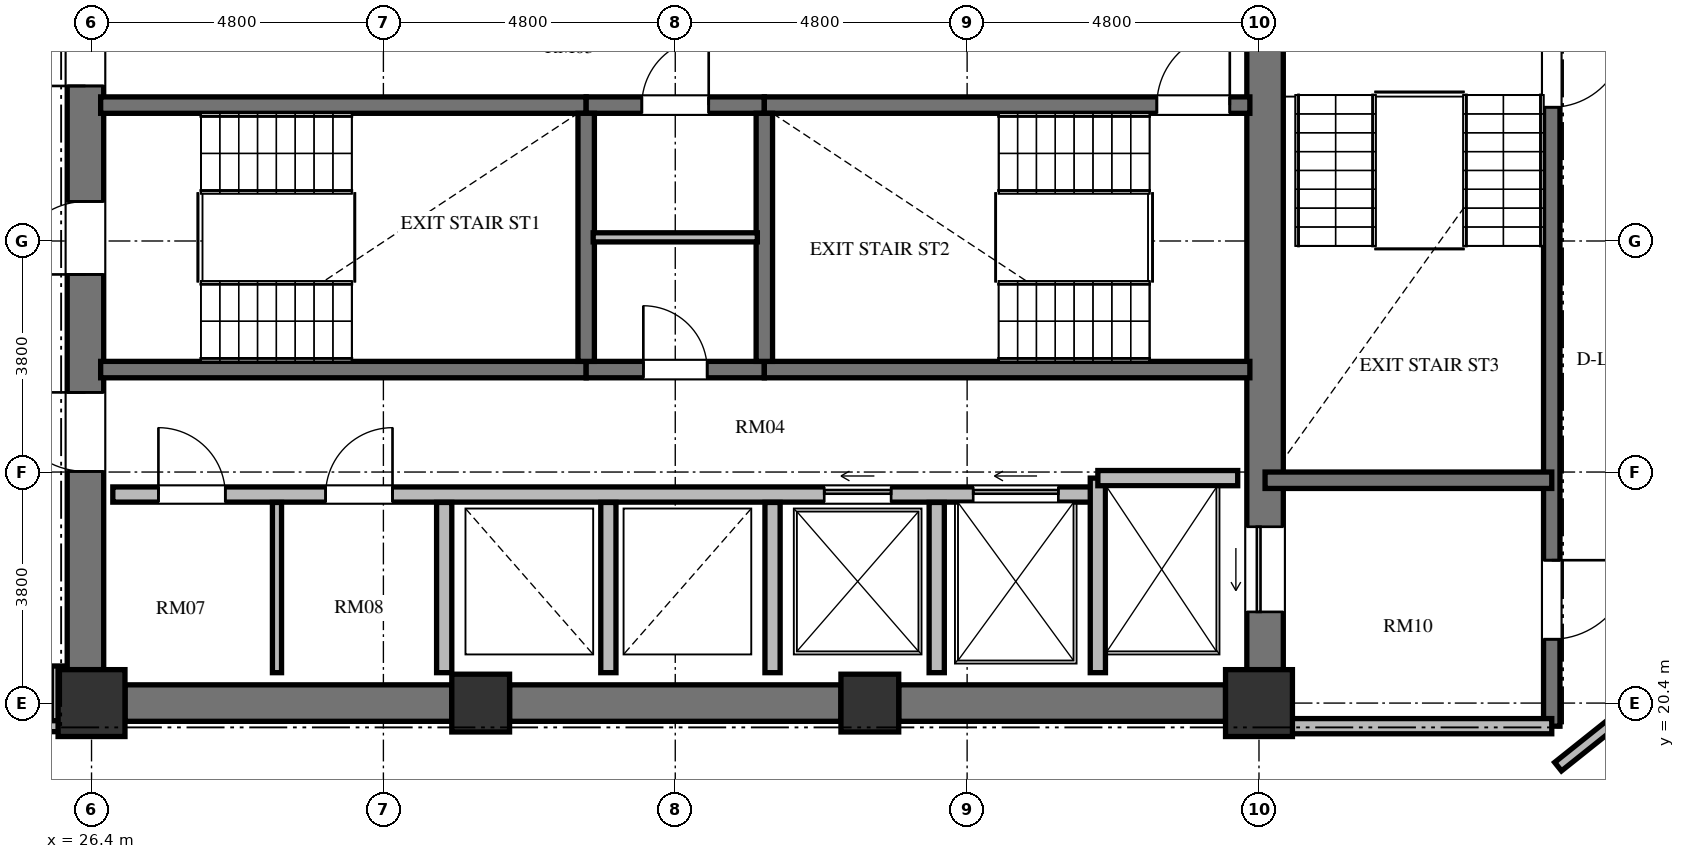
"""IFC4 building model, lengths in metres.
Left out: names, types, materials, properties, quantities, classifications, styles, units other than length and angle.
Written with IfcOpenShell. Run it as: python <this file> out.ifc"""

import sys

from ifc_helpers import new_model, si_unit, direction, frame, frame_2d, origin, origin_2d, place, context, subcontext, project, spatial, rectangle, extrude, element, fill, save


model = new_model("IFC4")
c1 = context("Model", 3, precision=1e-05, world=origin(), true_north=direction((0.0, 1.0)))
c2 = subcontext(c1, "Body", "Model", "MODEL_VIEW")
j1 = project(units=[si_unit("LENGTHUNIT", "METRE"), si_unit("PLANEANGLEUNIT", "RADIAN")], contexts=[c1])
p1 = place(None, origin())
s1 = spatial("IfcSite", under=j1, at=p1, CompositionType="ELEMENT")
p2 = place(p1, origin())
s2 = spatial("IfcBuilding", under=s1, at=p2, CompositionType="ELEMENT")
p3 = place(p2, frame((0.0, 0.0, 189.36)))
s3 = spatial("IfcBuildingStorey", under=s2, at=p3, CompositionType="ELEMENT", Elevation=189.36)
p4 = place(p3, frame((26.4, 20.4, 0.0), z_axis=(0.0, 0.0, 1.0), x_axis=(1.0, 0.0, 0.0)))
e1 = element("IfcColumn", 1, at=p4, inside=s3, PredefinedType="COLUMN", context=c2, shape_type="SweptSolid", body=[
    extrude(rectangle(XDim=1.1, YDim=1.1, at=origin_2d()), origin(), (0.0, 0.0, 1.0), 5.472),
])
for number, where, z_axis, x_axis in (
    (2, (32.8, 20.4, 0.0), (0.0, 0.0, 1.0), (1.0, 0.0, 0.0)),
    (3, (39.2, 20.4, 0.0), (0.0, 0.0, 1.0), (1.0, 0.0, 0.0)),
):
    element("IfcColumn", number, at=place(p3, frame(where, z_axis=z_axis, x_axis=x_axis)), inside=s3, PredefinedType="COLUMN", context=c2, shape_type="SweptSolid", body=[
        extrude(rectangle(XDim=0.95, YDim=0.95, at=origin_2d()), origin(), (0.0, 0.0, 1.0), 5.472),
    ])
p5 = place(p3, frame((45.6, 20.4, 0.0), z_axis=(0.0, 0.0, 1.0), x_axis=(1.0, 0.0, 0.0)))
e4 = element("IfcColumn", 4, at=p5, inside=s3, PredefinedType="COLUMN", context=c2, shape_type="SweptSolid", body=[
    extrude(rectangle(XDim=1.1, YDim=1.1, at=origin_2d()), origin(), (0.0, 0.0, 1.0), 5.472),
])
p6 = place(p3, frame((26.3, 20.95, 0.0), z_axis=(0.0, 0.0, 1.0), x_axis=(0.0, 1.0, 0.0)))
e5 = element("IfcWall", 5, at=p6, inside=s3, PredefinedType="SHEAR", context=c2, shape_type="SweptSolid", body=[
    extrude(rectangle(XDim=14.1, YDim=0.6, at=frame_2d((7.05, 0.0))), origin(), (0.0, 0.0, 1.0), 5.472),
])
p7 = place(p6, frame((6.5, 0.0, 0.0)))
e6 = element("IfcOpeningElement", 6, at=p7, cuts=e5, PredefinedType="OPENING", context=c2, shape_type="SweptSolid", body=[
    extrude(rectangle(XDim=1.2, YDim=2.15, at=frame_2d((0.6, 1.075))), frame((0.0, 0.31, 0.0), z_axis=(0.0, -1.0, 0.0), x_axis=(1.0, 0.0, 0.0)), (0.0, 0.0, 1.0), 0.62),
])
p8 = place(p6, frame((9.6, 0.0, 0.0)))
e7 = element("IfcOpeningElement", 7, at=p8, cuts=e5, PredefinedType="OPENING", context=c2, shape_type="SweptSolid", body=[
    extrude(rectangle(XDim=1.3, YDim=2.2, at=frame_2d((0.65, 1.1))), frame((0.0, 0.31, 0.0), z_axis=(0.0, -1.0, 0.0), x_axis=(1.0, 0.0, 0.0)), (0.0, 0.0, 1.0), 0.62),
])
p9 = place(p6, frame((3.26, 0.0, 0.0)))
e8 = element("IfcOpeningElement", 8, at=p9, cuts=e5, PredefinedType="OPENING", context=c2, shape_type="SweptSolid", body=[
    extrude(rectangle(XDim=1.3, YDim=2.2, at=frame_2d((0.65, 1.1))), frame((0.0, 0.31, 0.0), z_axis=(0.0, -1.0, 0.0), x_axis=(1.0, 0.0, 0.0)), (0.0, 0.0, 1.0), 0.62),
])
p10 = place(p3, frame((45.7, 20.95, 0.0), z_axis=(0.0, 0.0, 1.0), x_axis=(0.0, 1.0, 0.0)))
e9 = element("IfcWall", 9, at=p10, inside=s3, PredefinedType="SHEAR", context=c2, shape_type="SweptSolid", body=[
    extrude(rectangle(XDim=14.1, YDim=0.6, at=frame_2d((7.05, 0.0))), origin(), (0.0, 0.0, 1.0), 5.472),
])
p11 = place(p10, frame((11.75, 0.0, 0.0)))
e10 = element("IfcOpeningElement", 10, at=p11, cuts=e9, PredefinedType="OPENING", context=c2, shape_type="SweptSolid", body=[
    extrude(rectangle(XDim=1.4, YDim=2.3, at=frame_2d((0.7, 1.15))), frame((0.0, 0.31, 0.0), z_axis=(0.0, -1.0, 0.0), x_axis=(1.0, 0.0, 0.0)), (0.0, 0.0, 1.0), 0.62),
])
p12 = place(p10, frame((0.95, 0.0, 0.0)))
e11 = element("IfcOpeningElement", 11, at=p12, cuts=e9, PredefinedType="OPENING", context=c2, shape_type="SweptSolid", body=[
    extrude(rectangle(XDim=1.4, YDim=2.3, at=frame_2d((0.7, 1.15))), frame((0.0, 0.31, 0.0), z_axis=(0.0, -1.0, 0.0), x_axis=(1.0, 0.0, 0.0)), (0.0, 0.0, 1.0), 0.62),
])
p13 = place(p3, frame((26.95, 20.4, 0.0), z_axis=(0.0, 0.0, 1.0), x_axis=(1.0, 0.0, 0.0)))
e12 = element("IfcWall", 12, at=p13, inside=s3, PredefinedType="SHEAR", context=c2, shape_type="SweptSolid", body=[
    extrude(rectangle(XDim=5.375, YDim=0.6, at=frame_2d((2.688, 0.0))), origin(), (0.0, 0.0, 1.0), 5.472),
])
p14 = place(p3, frame((33.275, 20.4, 0.0), z_axis=(0.0, 0.0, 1.0), x_axis=(1.0, 0.0, 0.0)))
e13 = element("IfcWall", 13, at=p14, inside=s3, PredefinedType="SHEAR", context=c2, shape_type="SweptSolid", body=[
    extrude(rectangle(XDim=5.45, YDim=0.6, at=frame_2d((2.725, 0.0))), origin(), (0.0, 0.0, 1.0), 5.472),
])
p15 = place(p3, frame((39.675, 20.4, 0.0), z_axis=(0.0, 0.0, 1.0), x_axis=(1.0, 0.0, 0.0)))
e14 = element("IfcWall", 14, at=p15, inside=s3, PredefinedType="SHEAR", context=c2, shape_type="SweptSolid", body=[
    extrude(rectangle(XDim=5.375, YDim=0.6, at=frame_2d((2.688, 0.0))), origin(), (0.0, 0.0, 1.0), 5.472),
])
p16 = place(p3, frame((26.55, 30.235, 0.0), z_axis=(0.0, 0.0, 1.0), x_axis=(1.0, 0.0, 0.0)))
e15 = element("IfcWall", 15, at=p16, inside=s3, PredefinedType="SHEAR", context=c2, shape_type="SweptSolid", body=[
    extrude(rectangle(XDim=7.985, YDim=0.27, at=frame_2d((3.992, 0.0))), origin(), (0.0, 0.0, 1.0), 5.472),
])
p17 = place(p3, frame((34.535, 30.235, 0.0), z_axis=(0.0, 0.0, 1.0), x_axis=(1.0, 0.0, 0.0)))
e16 = element("IfcWall", 16, at=p17, inside=s3, PredefinedType="SHEAR", context=c2, shape_type="SweptSolid", body=[
    extrude(rectangle(XDim=2.93, YDim=0.27, at=frame_2d((1.465, 0.0))), origin(), (0.0, 0.0, 1.0), 5.472),
])
p18 = place(p17, frame((0.915, 0.0, 0.0)))
e17 = element("IfcOpeningElement", 17, at=p18, cuts=e16, PredefinedType="OPENING", context=c2, shape_type="SweptSolid", body=[
    extrude(rectangle(XDim=1.1, YDim=2.15, at=frame_2d((0.55, 1.075))), frame((0.0, 0.145, 0.0), z_axis=(0.0, -1.0, 0.0), x_axis=(1.0, 0.0, 0.0)), (0.0, 0.0, 1.0), 0.29),
])
p19 = place(p3, frame((37.465, 30.235, 0.0), z_axis=(0.0, 0.0, 1.0), x_axis=(1.0, 0.0, 0.0)))
e18 = element("IfcWall", 18, at=p19, inside=s3, PredefinedType="SHEAR", context=c2, shape_type="SweptSolid", body=[
    extrude(rectangle(XDim=7.985, YDim=0.27, at=frame_2d((3.992, 0.0))), origin(), (0.0, 0.0, 1.0), 5.472),
])
p20 = place(p19, frame((6.455, 0.0, 0.0)))
e19 = element("IfcOpeningElement", 19, at=p20, cuts=e18, PredefinedType="OPENING", context=c2, shape_type="SweptSolid", body=[
    extrude(rectangle(XDim=1.2, YDim=2.15, at=frame_2d((0.6, 1.075))), frame((0.0, 0.145, 0.0), z_axis=(0.0, -1.0, 0.0), x_axis=(1.0, 0.0, 0.0)), (0.0, 0.0, 1.0), 0.29),
])
p21 = place(p3, frame((26.55, 25.885, 0.0), z_axis=(0.0, 0.0, 1.0), x_axis=(1.0, 0.0, 0.0)))
e20 = element("IfcWall", 20, at=p21, inside=s3, PredefinedType="SHEAR", context=c2, shape_type="SweptSolid", body=[
    extrude(rectangle(XDim=7.985, YDim=0.27, at=frame_2d((3.992, 0.0))), origin(), (0.0, 0.0, 1.0), 5.472),
])
p22 = place(p3, frame((34.535, 25.885, 0.0), z_axis=(0.0, 0.0, 1.0), x_axis=(1.0, 0.0, 0.0)))
e21 = element("IfcWall", 21, at=p22, inside=s3, PredefinedType="SHEAR", context=c2, shape_type="SweptSolid", body=[
    extrude(rectangle(XDim=2.93, YDim=0.27, at=frame_2d((1.465, 0.0))), origin(), (0.0, 0.0, 1.0), 5.472),
])
p23 = place(p22, frame((0.94, 0.0, 0.0)))
e22 = element("IfcOpeningElement", 22, at=p23, cuts=e21, PredefinedType="OPENING", context=c2, shape_type="SweptSolid", body=[
    extrude(rectangle(XDim=1.05, YDim=2.15, at=frame_2d((0.525, 1.075))), frame((0.0, 0.145, 0.0), z_axis=(0.0, -1.0, 0.0), x_axis=(1.0, 0.0, 0.0)), (0.0, 0.0, 1.0), 0.29),
])
p24 = place(p3, frame((37.465, 25.885, 0.0), z_axis=(0.0, 0.0, 1.0), x_axis=(1.0, 0.0, 0.0)))
e23 = element("IfcWall", 23, at=p24, inside=s3, PredefinedType="SHEAR", context=c2, shape_type="SweptSolid", body=[
    extrude(rectangle(XDim=7.985, YDim=0.27, at=frame_2d((3.992, 0.0))), origin(), (0.0, 0.0, 1.0), 5.472),
])
for number, where, z_axis, x_axis in (
    (24, (34.535, 26.02, 0.0), (0.0, 0.0, 1.0), (0.0, 1.0, 0.0)),
    (25, (37.465, 26.02, 0.0), (0.0, 0.0, 1.0), (0.0, 1.0, 0.0)),
):
    element("IfcWall", number, at=place(p3, frame(where, z_axis=z_axis, x_axis=x_axis)), inside=s3, PredefinedType="SHEAR", context=c2, shape_type="SweptSolid", body=[
        extrude(rectangle(XDim=4.08, YDim=0.27, at=frame_2d((2.04, 0.0))), origin(), (0.0, 0.0, 1.0), 5.472),
    ])
p25 = place(p3, frame((34.65, 28.06, 0.0), z_axis=(0.0, 0.0, 1.0), x_axis=(1.0, 0.0, 0.0)))
e26 = element("IfcWall", 26, at=p25, inside=s3, PredefinedType="PARTITIONING", context=c2, shape_type="SweptSolid", body=[
    extrude(rectangle(XDim=2.7, YDim=0.15, at=frame_2d((1.35, 0.0))), origin(), (0.0, 0.0, 1.0), 5.022),
])
p26 = place(p3, frame((26.75, 23.83, 0.0), z_axis=(0.0, 0.0, 1.0), x_axis=(1.0, 0.0, 0.0)))
e27 = element("IfcWall", 27, at=p26, inside=s3, PredefinedType="SOLIDWALL", context=c2, shape_type="SweptSolid", body=[
    extrude(rectangle(XDim=16.2, YDim=0.25, at=frame_2d((8.1, 0.0))), origin(), (0.0, 0.0, 1.0), 5.022),
])
p27 = place(p26, frame((0.75, 0.0, 0.0)))
e28 = element("IfcOpeningElement", 28, at=p27, cuts=e27, PredefinedType="OPENING", context=c2, shape_type="SweptSolid", body=[
    extrude(rectangle(XDim=1.1, YDim=2.15, at=frame_2d((0.55, 1.075))), frame((0.0, 0.135, 0.0), z_axis=(0.0, -1.0, 0.0), x_axis=(1.0, 0.0, 0.0)), (0.0, 0.0, 1.0), 0.27),
])
p28 = place(p26, frame((3.5, 0.0, 0.0)))
e29 = element("IfcOpeningElement", 29, at=p28, cuts=e27, PredefinedType="OPENING", context=c2, shape_type="SweptSolid", body=[
    extrude(rectangle(XDim=1.1, YDim=2.15, at=frame_2d((0.55, 1.075))), frame((0.0, 0.135, 0.0), z_axis=(0.0, -1.0, 0.0), x_axis=(1.0, 0.0, 0.0)), (0.0, 0.0, 1.0), 0.27),
])
p29 = place(p26, frame((11.7, 0.0, 0.0)))
e30 = element("IfcOpeningElement", 30, at=p29, cuts=e27, PredefinedType="OPENING", context=c2, shape_type="SweptSolid", body=[
    extrude(rectangle(XDim=1.1, YDim=2.2, at=frame_2d((0.55, 1.1))), frame((0.0, 0.135, 0.0), z_axis=(0.0, -1.0, 0.0), x_axis=(1.0, 0.0, 0.0)), (0.0, 0.0, 1.0), 0.27),
])
p30 = place(p26, frame((14.15, 0.0, 0.0)))
e31 = element("IfcOpeningElement", 31, at=p30, cuts=e27, PredefinedType="OPENING", context=c2, shape_type="SweptSolid", body=[
    extrude(rectangle(XDim=1.4, YDim=2.3, at=frame_2d((0.7, 1.15))), frame((0.0, 0.135, 0.0), z_axis=(0.0, -1.0, 0.0), x_axis=(1.0, 0.0, 0.0)), (0.0, 0.0, 1.0), 0.27),
])
p31 = place(p3, frame((42.95, 20.9, 0.0), z_axis=(0.0, 0.0, 1.0), x_axis=(0.0, 1.0, 0.0)))
e32 = element("IfcWall", 32, at=p31, inside=s3, PredefinedType="SOLIDWALL", context=c2, shape_type="SweptSolid", body=[
    extrude(rectangle(XDim=3.2, YDim=0.25, at=frame_2d((1.6, 0.0))), origin(), (0.0, 0.0, 1.0), 5.022),
])
p32 = place(p3, frame((42.95, 24.1, 0.0), z_axis=(0.0, 0.0, 1.0), x_axis=(1.0, 0.0, 0.0)))
e33 = element("IfcWall", 33, at=p32, inside=s3, PredefinedType="SOLIDWALL", context=c2, shape_type="SweptSolid", body=[
    extrude(rectangle(XDim=2.3, YDim=0.25, at=frame_2d((1.15, 0.0))), origin(), (0.0, 0.0, 1.0), 5.022),
])
for number, where, z_axis, x_axis in (
    (34, (32.2, 20.9, 0.0), (0.0, 0.0, 1.0), (0.0, 1.0, 0.0)),
    (35, (34.9, 20.9, 0.0), (0.0, 0.0, 1.0), (0.0, 1.0, 0.0)),
    (36, (37.6, 20.9, 0.0), (0.0, 0.0, 1.0), (0.0, 1.0, 0.0)),
    (37, (40.3, 20.9, 0.0), (0.0, 0.0, 1.0), (0.0, 1.0, 0.0)),
):
    element("IfcWall", number, at=place(p3, frame(where, z_axis=z_axis, x_axis=x_axis)), inside=s3, PredefinedType="SOLIDWALL", context=c2, shape_type="SweptSolid", body=[
        extrude(rectangle(XDim=2.8, YDim=0.25, at=frame_2d((1.4, 0.0))), origin(), (0.0, 0.0, 1.0), 5.022),
    ])
p33 = place(p3, frame((29.45, 20.9, 0.0), z_axis=(0.0, 0.0, 1.0), x_axis=(0.0, 1.0, 0.0)))
e38 = element("IfcWall", 38, at=p33, inside=s3, PredefinedType="PARTITIONING", context=c2, shape_type="SweptSolid", body=[
    extrude(rectangle(XDim=2.8, YDim=0.15, at=frame_2d((1.4, 0.0))), origin(), (0.0, 0.0, 1.0), 5.022),
])
p34 = place(p3, frame((50.415, 35.845, 0.0), z_axis=(0.0, 0.0, 1.0), x_axis=(0.0, -1.0, 0.0)))
e39 = element("IfcWall", 39, at=p34, inside=s3, PredefinedType="SHEAR", context=c2, shape_type="SweptSolid", body=[
    extrude(rectangle(XDim=15.825, YDim=0.27, at=frame_2d((7.913, 0.0))), origin(), (0.0, 0.0, 1.0), 5.472),
])
p35 = place(p34, frame((4.445, 0.0, 0.0)))
e40 = element("IfcOpeningElement", 40, at=p35, cuts=e39, PredefinedType="OPENING", context=c2, shape_type="SweptSolid", body=[
    extrude(rectangle(XDim=1.2, YDim=2.15, at=frame_2d((0.6, 1.075))), frame((0.0, 0.145, 0.0), z_axis=(0.0, -1.0, 0.0), x_axis=(1.0, 0.0, 0.0)), (0.0, 0.0, 1.0), 0.29),
])
p36 = place(p34, frame((1.295, 0.0, 0.0)))
e41 = element("IfcOpeningElement", 41, at=p36, cuts=e39, PredefinedType="OPENING", context=c2, shape_type="SweptSolid", body=[
    extrude(rectangle(XDim=1.3, YDim=2.2, at=frame_2d((0.65, 1.1))), frame((0.0, 0.145, 0.0), z_axis=(0.0, -1.0, 0.0), x_axis=(1.0, 0.0, 0.0)), (0.0, 0.0, 1.0), 0.29),
])
p37 = place(p34, frame((13.095, 0.0, 0.0)))
e42 = element("IfcOpeningElement", 42, at=p37, cuts=e39, PredefinedType="OPENING", context=c2, shape_type="SweptSolid", body=[
    extrude(rectangle(XDim=1.3, YDim=2.2, at=frame_2d((0.65, 1.1))), frame((0.0, 0.145, 0.0), z_axis=(0.0, -1.0, 0.0), x_axis=(1.0, 0.0, 0.0)), (0.0, 0.0, 1.0), 0.29),
])
p38 = place(p3, frame((45.7, 24.065, 0.0), z_axis=(0.0, 0.0, 1.0), x_axis=(1.0, 0.0, 0.0)))
e43 = element("IfcWall", 43, at=p38, inside=s3, PredefinedType="SHEAR", context=c2, shape_type="SweptSolid", body=[
    extrude(rectangle(XDim=4.715, YDim=0.27, at=frame_2d((2.357, 0.0))), origin(), (0.0, 0.0, 1.0), 5.472),
])
p39 = place(p3, frame((45.7, 20.02, 0.0), z_axis=(0.0, 0.0, 1.0), x_axis=(1.0, 0.0, 0.0)))
e44 = element("IfcWall", 44, at=p39, inside=s3, PredefinedType="SOLIDWALL", context=c2, shape_type="SweptSolid", body=[
    extrude(rectangle(XDim=4.715, YDim=0.25, at=frame_2d((2.357, 0.0))), origin(), (0.0, 0.0, 1.0), 5.022),
])
p40 = place(p3, frame((52.781, 21.161, 0.0), z_axis=(0.0, 0.0, 1.0), x_axis=(-0.781386795829, -0.624047013697, 0.0)))
e45 = element("IfcWall", 45, at=p40, inside=s3, PredefinedType="PARTITIONING", context=c2, shape_type="SweptSolid", body=[
    extrude(rectangle(XDim=2.896, YDim=0.18, at=frame_2d((1.448, 0.0))), origin(), (0.0, 0.0, 1.0), 5.022),
])
p41 = place(p3, frame((25.83, 21.01, 0.0), z_axis=(0.0, 0.0, 1.0), x_axis=(0.0, -1.0, 0.0)))
e46 = element("IfcWall", 46, at=p41, inside=s3, PredefinedType="PARTITIONING", context=c2, shape_type="SweptSolid", body=[
    extrude(rectangle(XDim=1.03, YDim=0.18, at=frame_2d((0.515, 0.0))), origin(), (0.0, 0.0, 1.0), 5.022),
])
p42 = place(p3, frame((25.87, 20.02, 0.0), z_axis=(0.0, 0.0, 1.0), x_axis=(-1.0, 0.0, 0.0)))
e47 = element("IfcWall", 47, at=p42, inside=s3, PredefinedType="PARTITIONING", context=c2, shape_type="SweptSolid", body=[
    extrude(rectangle(XDim=2.56, YDim=0.18, at=frame_2d((1.28, 0.0))), origin(), (0.0, 0.0, 1.0), 5.022),
])
p43 = place(p7, origin())
e48 = element("IfcDoor", 48, at=p43, inside=s3, OperationType="SINGLE_SWING_LEFT", PredefinedType="DOOR", context=c2, shape_type="SweptSolid", body=[
    extrude(rectangle(XDim=1.2, YDim=2.15, at=frame_2d((0.6, 1.075))), frame((0.0, 0.025, 0.0), z_axis=(0.0, -1.0, 0.0), x_axis=(1.0, 0.0, 0.0)), (0.0, 0.0, 1.0), 0.05),
])
fill(e6, e48)
p44 = place(p20, origin())
e49 = element("IfcDoor", 49, at=p44, inside=s3, OperationType="SINGLE_SWING_RIGHT", PredefinedType="DOOR", context=c2, shape_type="SweptSolid", body=[
    extrude(rectangle(XDim=1.2, YDim=2.15, at=frame_2d((0.6, 1.075))), frame((0.0, 0.025, 0.0), z_axis=(0.0, -1.0, 0.0), x_axis=(1.0, 0.0, 0.0)), (0.0, 0.0, 1.0), 0.05),
])
fill(e19, e49)
p45 = place(p23, origin())
e50 = element("IfcDoor", 50, at=p45, inside=s3, OperationType="SINGLE_SWING_LEFT", PredefinedType="DOOR", context=c2, shape_type="SweptSolid", body=[
    extrude(rectangle(XDim=1.05, YDim=2.15, at=frame_2d((0.525, 1.075))), frame((0.0, 0.025, 0.0), z_axis=(0.0, -1.0, 0.0), x_axis=(1.0, 0.0, 0.0)), (0.0, 0.0, 1.0), 0.05),
])
fill(e22, e50)
p46 = place(p18, origin())
e51 = element("IfcDoor", 51, at=p46, inside=s3, OperationType="SINGLE_SWING_RIGHT", PredefinedType="DOOR", context=c2, shape_type="SweptSolid", body=[
    extrude(rectangle(XDim=1.1, YDim=2.15, at=frame_2d((0.55, 1.075))), frame((0.0, 0.025, 0.0), z_axis=(0.0, -1.0, 0.0), x_axis=(1.0, 0.0, 0.0)), (0.0, 0.0, 1.0), 0.05),
])
fill(e17, e51)
p47 = place(p8, origin())
e52 = element("IfcDoor", 52, at=p47, inside=s3, OperationType="SINGLE_SWING_LEFT", PredefinedType="DOOR", context=c2, shape_type="SweptSolid", body=[
    extrude(rectangle(XDim=1.3, YDim=2.2, at=frame_2d((0.65, 1.1))), frame((0.0, 0.025, 0.0), z_axis=(0.0, -1.0, 0.0), x_axis=(1.0, 0.0, 0.0)), (0.0, 0.0, 1.0), 0.05),
])
fill(e7, e52)
p48 = place(p9, origin())
e53 = element("IfcDoor", 53, at=p48, inside=s3, OperationType="SINGLE_SWING_RIGHT", PredefinedType="DOOR", context=c2, shape_type="SweptSolid", body=[
    extrude(rectangle(XDim=1.3, YDim=2.2, at=frame_2d((0.65, 1.1))), frame((0.0, 0.025, 0.0), z_axis=(0.0, -1.0, 0.0), x_axis=(1.0, 0.0, 0.0)), (0.0, 0.0, 1.0), 0.05),
])
fill(e8, e53)
p49 = place(p27, origin())
e54 = element("IfcDoor", 54, at=p49, inside=s3, OperationType="SINGLE_SWING_LEFT", PredefinedType="DOOR", context=c2, shape_type="SweptSolid", body=[
    extrude(rectangle(XDim=1.1, YDim=2.15, at=frame_2d((0.55, 1.075))), frame((0.0, 0.025, 0.0), z_axis=(0.0, -1.0, 0.0), x_axis=(1.0, 0.0, 0.0)), (0.0, 0.0, 1.0), 0.05),
])
fill(e28, e54)
p50 = place(p28, origin())
e55 = element("IfcDoor", 55, at=p50, inside=s3, OperationType="SINGLE_SWING_RIGHT", PredefinedType="DOOR", context=c2, shape_type="SweptSolid", body=[
    extrude(rectangle(XDim=1.1, YDim=2.15, at=frame_2d((0.55, 1.075))), frame((0.0, 0.025, 0.0), z_axis=(0.0, -1.0, 0.0), x_axis=(1.0, 0.0, 0.0)), (0.0, 0.0, 1.0), 0.05),
])
fill(e29, e55)
p51 = place(p29, origin())
e56 = element("IfcDoor", 56, at=p51, inside=s3, OperationType="SLIDING_TO_LEFT", PredefinedType="DOOR", context=c2, shape_type="SweptSolid", body=[
    extrude(rectangle(XDim=1.1, YDim=2.2, at=frame_2d((0.55, 1.1))), frame((0.0, 0.025, 0.0), z_axis=(0.0, -1.0, 0.0), x_axis=(1.0, 0.0, 0.0)), (0.0, 0.0, 1.0), 0.05),
])
fill(e30, e56)
p52 = place(p12, origin())
e57 = element("IfcDoor", 57, at=p52, inside=s3, OperationType="SLIDING_TO_LEFT", PredefinedType="DOOR", context=c2, shape_type="SweptSolid", body=[
    extrude(rectangle(XDim=1.4, YDim=2.3, at=frame_2d((0.7, 1.15))), frame((0.0, 0.025, 0.0), z_axis=(0.0, -1.0, 0.0), x_axis=(1.0, 0.0, 0.0)), (0.0, 0.0, 1.0), 0.05),
])
fill(e11, e57)
p53 = place(p30, origin())
e58 = element("IfcDoor", 58, at=p53, inside=s3, OperationType="SLIDING_TO_LEFT", PredefinedType="DOOR", context=c2, shape_type="SweptSolid", body=[
    extrude(rectangle(XDim=1.4, YDim=2.3, at=frame_2d((0.7, 1.15))), frame((0.0, 0.025, 0.0), z_axis=(0.0, -1.0, 0.0), x_axis=(1.0, 0.0, 0.0)), (0.0, 0.0, 1.0), 0.05),
])
fill(e31, e58)
p54 = place(p35, origin())
e59 = element("IfcDoor", 59, at=p54, inside=s3, OperationType="SINGLE_SWING_LEFT", PredefinedType="DOOR", context=c2, shape_type="SweptSolid", body=[
    extrude(rectangle(XDim=1.2, YDim=2.15, at=frame_2d((0.6, 1.075))), frame((0.0, 0.025, 0.0), z_axis=(0.0, -1.0, 0.0), x_axis=(1.0, 0.0, 0.0)), (0.0, 0.0, 1.0), 0.05),
])
fill(e40, e59)
p55 = place(p37, origin())
e60 = element("IfcDoor", 60, at=p55, inside=s3, OperationType="SINGLE_SWING_LEFT", PredefinedType="DOOR", context=c2, shape_type="SweptSolid", body=[
    extrude(rectangle(XDim=1.3, YDim=2.2, at=frame_2d((0.65, 1.1))), frame((0.0, 0.025, 0.0), z_axis=(0.0, -1.0, 0.0), x_axis=(1.0, 0.0, 0.0)), (0.0, 0.0, 1.0), 0.05),
])
fill(e42, e60)
save(model, sys.argv[1])
